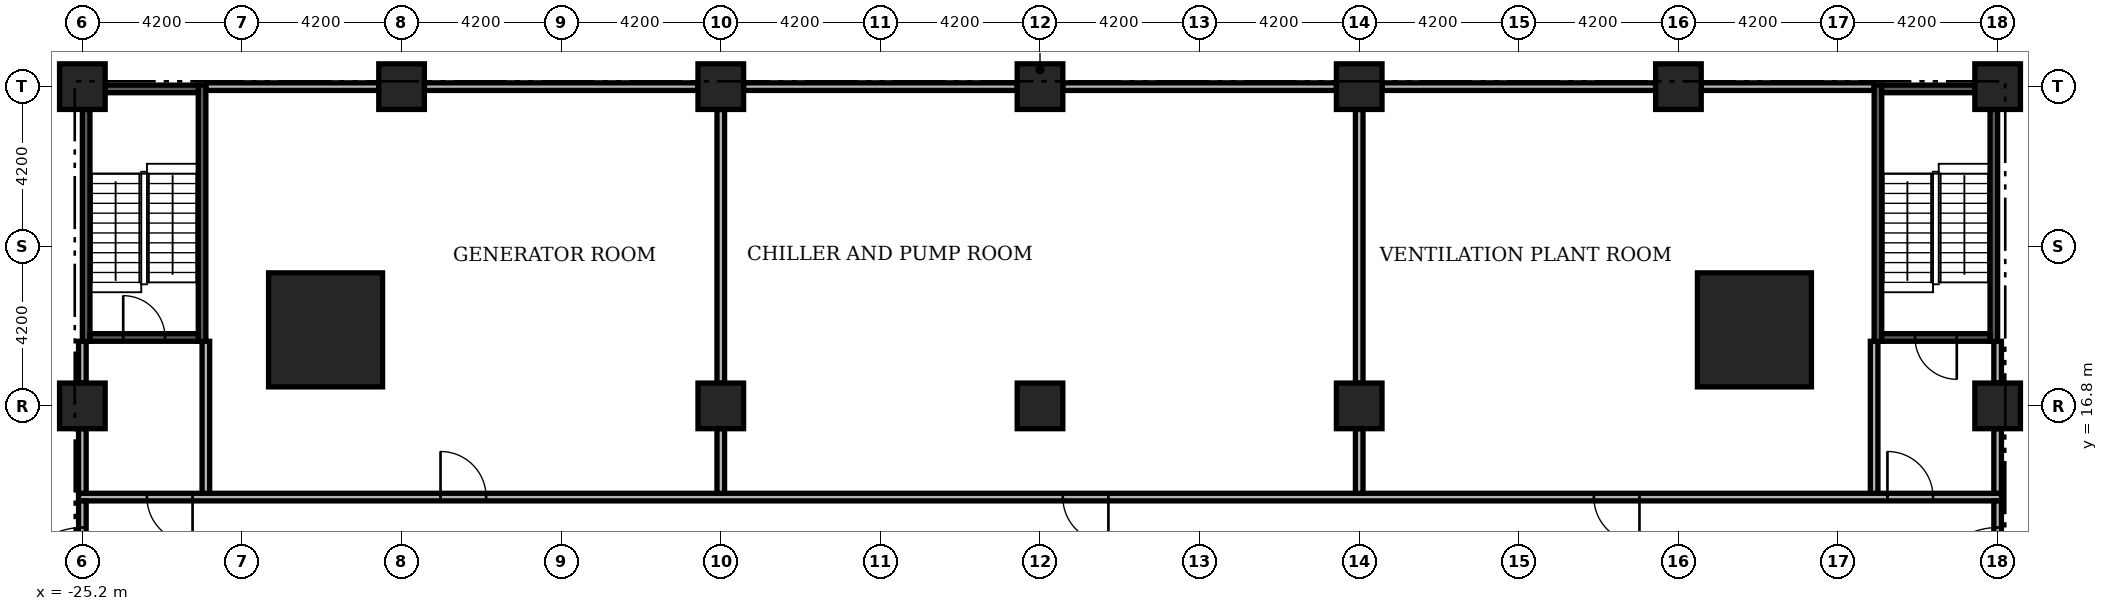
"""IFC4 building model, lengths in metres.
Left out: names, types, materials, properties, quantities, classifications, styles, units other than length and angle.
Written with IfcOpenShell. Run it as: python <this file> out.ifc"""

import sys

from ifc_helpers import new_model, si_unit, direction, frame, frame_2d, origin, origin_2d, place, context, subcontext, project, spatial, rectangle, extrude, element, fill, save


model = new_model("IFC4")
c1 = context("Model", 3, precision=1e-05, world=origin(), true_north=direction((0.0, 1.0)))
c2 = subcontext(c1, "Body", "Model", "MODEL_VIEW")
j1 = project(units=[si_unit("LENGTHUNIT", "METRE"), si_unit("PLANEANGLEUNIT", "RADIAN")], contexts=[c1])
p1 = place(None, origin())
s1 = spatial("IfcSite", under=j1, at=p1, CompositionType="ELEMENT")
p2 = place(p1, origin())
s2 = spatial("IfcBuilding", under=s1, at=p2, CompositionType="ELEMENT")
p3 = place(p2, frame((0.0, 0.0, -8.4)))
s3 = spatial("IfcBuildingStorey", under=s2, at=p3, CompositionType="ELEMENT", Elevation=-8.4)
for number, where, z_axis, x_axis in (
    (1, (18.8, 18.8, 0.0), (0.0, 0.0, 1.0), (1.0, 0.0, 0.0)),
    (2, (-18.8, 18.8, 0.0), (0.0, 0.0, 1.0), (1.0, 0.0, 0.0)),
):
    element("IfcColumn", number, at=place(p3, frame(where, z_axis=z_axis, x_axis=x_axis)), inside=s3, PredefinedType="COLUMN", context=c2, shape_type="SweptSolid", body=[
        extrude(rectangle(XDim=3.0, YDim=3.0, at=origin_2d()), origin(), (0.0, 0.0, 1.0), 4.2),
    ])
for number, where, z_axis, x_axis in (
    (3, (25.2, 16.8, 0.0), (0.0, 0.0, 1.0), (1.0, 0.0, 0.0)),
    (4, (0.0, 25.2, 0.0), (0.0, 0.0, 1.0), (1.0, 0.0, 0.0)),
    (5, (-8.4, 25.2, 0.0), (0.0, 0.0, 1.0), (1.0, 0.0, 0.0)),
    (6, (-16.8, 25.2, 0.0), (0.0, 0.0, 1.0), (1.0, 0.0, 0.0)),
    (7, (8.4, 25.2, 0.0), (0.0, 0.0, 1.0), (1.0, 0.0, 0.0)),
    (8, (16.8, 25.2, 0.0), (0.0, 0.0, 1.0), (1.0, 0.0, 0.0)),
    (9, (-25.2, 16.8, 0.0), (0.0, 0.0, 1.0), (1.0, 0.0, 0.0)),
    (10, (0.0, 16.8, 0.0), (0.0, 0.0, 1.0), (1.0, 0.0, 0.0)),
    (11, (8.4, 16.8, 0.0), (0.0, 0.0, 1.0), (1.0, 0.0, 0.0)),
    (12, (25.2, 25.2, 0.0), (0.0, 0.0, 1.0), (1.0, 0.0, 0.0)),
    (13, (-8.4, 16.8, 0.0), (0.0, 0.0, 1.0), (1.0, 0.0, 0.0)),
    (14, (-25.2, 25.2, 0.0), (0.0, 0.0, 1.0), (1.0, 0.0, 0.0)),
):
    element("IfcColumn", number, at=place(p3, frame(where, z_axis=z_axis, x_axis=x_axis)), inside=s3, PredefinedType="COLUMN", context=c2, shape_type="SweptSolid", body=[
        extrude(rectangle(XDim=1.2, YDim=1.2, at=origin_2d()), origin(), (0.0, 0.0, 1.0), 4.2),
    ])
p4 = place(p3, frame((-25.3, 14.4, 0.0), z_axis=(0.0, 0.0, 1.0), x_axis=(1.0, 0.0, 0.0)))
e15 = element("IfcWall", 15, at=p4, inside=s3, PredefinedType="PARTITIONING", context=c2, shape_type="SweptSolid", body=[
    extrude(rectangle(XDim=50.6, YDim=0.2, at=frame_2d((25.3, 0.0))), origin(), (0.0, 0.0, 1.0), 3.85),
])
p5 = place(p4, frame((1.8, 0.0, 0.0)))
e16 = element("IfcOpeningElement", 16, at=p5, cuts=e15, PredefinedType="OPENING", context=c2, shape_type="SweptSolid", body=[
    extrude(rectangle(XDim=1.2, YDim=2.2, at=frame_2d((0.6, 1.1))), frame((0.0, 0.11, 0.0), z_axis=(0.0, -1.0, 0.0), x_axis=(1.0, 0.0, 0.0)), (0.0, 0.0, 1.0), 0.22),
])
p6 = place(p4, frame((9.525, 0.0, 0.0)))
e17 = element("IfcOpeningElement", 17, at=p6, cuts=e15, PredefinedType="OPENING", context=c2, shape_type="SweptSolid", body=[
    extrude(rectangle(XDim=1.2, YDim=2.2, at=frame_2d((0.6, 1.1))), frame((0.0, 0.11, 0.0), z_axis=(0.0, -1.0, 0.0), x_axis=(1.0, 0.0, 0.0)), (0.0, 0.0, 1.0), 0.22),
])
p7 = place(p4, frame((25.9, 0.0, 0.0)))
e18 = element("IfcOpeningElement", 18, at=p7, cuts=e15, PredefinedType="OPENING", context=c2, shape_type="SweptSolid", body=[
    extrude(rectangle(XDim=1.2, YDim=2.2, at=frame_2d((0.6, 1.1))), frame((0.0, 0.11, 0.0), z_axis=(0.0, -1.0, 0.0), x_axis=(1.0, 0.0, 0.0)), (0.0, 0.0, 1.0), 0.22),
])
p8 = place(p4, frame((39.875, 0.0, 0.0)))
e19 = element("IfcOpeningElement", 19, at=p8, cuts=e15, PredefinedType="OPENING", context=c2, shape_type="SweptSolid", body=[
    extrude(rectangle(XDim=1.2, YDim=2.2, at=frame_2d((0.6, 1.1))), frame((0.0, 0.11, 0.0), z_axis=(0.0, -1.0, 0.0), x_axis=(1.0, 0.0, 0.0)), (0.0, 0.0, 1.0), 0.22),
])
p9 = place(p4, frame((47.6, 0.0, 0.0)))
e20 = element("IfcOpeningElement", 20, at=p9, cuts=e15, PredefinedType="OPENING", context=c2, shape_type="SweptSolid", body=[
    extrude(rectangle(XDim=1.2, YDim=2.2, at=frame_2d((0.6, 1.1))), frame((0.0, 0.11, 0.0), z_axis=(0.0, -1.0, 0.0), x_axis=(1.0, 0.0, 0.0)), (0.0, 0.0, 1.0), 0.22),
])
p10 = place(p3, frame((-21.95, 25.2, 0.0), z_axis=(0.0, 0.0, 1.0), x_axis=(1.0, 0.0, 0.0)))
e21 = element("IfcWall", 21, at=p10, inside=s3, PredefinedType="PARTITIONING", context=c2, shape_type="SweptSolid", body=[
    extrude(rectangle(XDim=4.55, YDim=0.2, at=frame_2d((2.275, 0.0))), origin(), (0.0, 0.0, 1.0), 3.85),
])
for number, where, z_axis, x_axis in (
    (22, (-16.2, 25.2, 0.0), (0.0, 0.0, 1.0), (1.0, 0.0, 0.0)),
    (23, (-7.8, 25.2, 0.0), (0.0, 0.0, 1.0), (1.0, 0.0, 0.0)),
    (24, (0.6, 25.2, 0.0), (0.0, 0.0, 1.0), (1.0, 0.0, 0.0)),
    (25, (9.0, 25.2, 0.0), (0.0, 0.0, 1.0), (1.0, 0.0, 0.0)),
):
    element("IfcWall", number, at=place(p3, frame(where, z_axis=z_axis, x_axis=x_axis)), inside=s3, PredefinedType="PARTITIONING", context=c2, shape_type="SweptSolid", body=[
        extrude(rectangle(XDim=7.2, YDim=0.2, at=frame_2d((3.6, 0.0))), origin(), (0.0, 0.0, 1.0), 3.85),
    ])
p11 = place(p3, frame((17.4, 25.2, 0.0), z_axis=(0.0, 0.0, 1.0), x_axis=(1.0, 0.0, 0.0)))
e26 = element("IfcWall", 26, at=p11, inside=s3, PredefinedType="PARTITIONING", context=c2, shape_type="SweptSolid", body=[
    extrude(rectangle(XDim=4.55, YDim=0.2, at=frame_2d((2.275, 0.0))), origin(), (0.0, 0.0, 1.0), 3.85),
])
p12 = place(p3, frame((-25.2, 11.1, 0.0), z_axis=(0.0, 0.0, 1.0), x_axis=(0.0, 1.0, 0.0)))
e27 = element("IfcWall", 27, at=p12, inside=s3, PredefinedType="PARTITIONING", context=c2, shape_type="SweptSolid", body=[
    extrude(rectangle(XDim=3.2, YDim=0.2, at=frame_2d((1.6, 0.0))), origin(), (0.0, 0.0, 1.0), 3.85),
])
p13 = place(p12, frame((0.7, 0.0, 0.0)))
e28 = element("IfcOpeningElement", 28, at=p13, cuts=e27, PredefinedType="OPENING", context=c2, shape_type="SweptSolid", body=[
    extrude(rectangle(XDim=1.8, YDim=2.2, at=frame_2d((0.9, 1.1))), frame((0.0, 0.11, 0.0), z_axis=(0.0, -1.0, 0.0), x_axis=(1.0, 0.0, 0.0)), (0.0, 0.0, 1.0), 0.22),
])
p14 = place(p3, frame((-25.2, 14.5, 0.0), z_axis=(0.0, 0.0, 1.0), x_axis=(0.0, 1.0, 0.0)))
e29 = element("IfcWall", 29, at=p14, inside=s3, PredefinedType="PARTITIONING", context=c2, shape_type="SweptSolid", body=[
    extrude(rectangle(XDim=1.7, YDim=0.2, at=frame_2d((0.85, 0.0))), origin(), (0.0, 0.0, 1.0), 3.85),
])
p15 = place(p3, frame((-25.2, 17.4, 0.0), z_axis=(0.0, 0.0, 1.0), x_axis=(0.0, 1.0, 0.0)))
e30 = element("IfcWall", 30, at=p15, inside=s3, PredefinedType="PARTITIONING", context=c2, shape_type="SweptSolid", body=[
    extrude(rectangle(XDim=1.1, YDim=0.2, at=frame_2d((0.55, 0.0))), origin(), (0.0, 0.0, 1.0), 3.85),
])
p16 = place(p3, frame((-21.95, 14.5, 0.0), z_axis=(0.0, 0.0, 1.0), x_axis=(0.0, 1.0, 0.0)))
e31 = element("IfcWall", 31, at=p16, inside=s3, PredefinedType="PARTITIONING", context=c2, shape_type="SweptSolid", body=[
    extrude(rectangle(XDim=4.0, YDim=0.2, at=frame_2d((2.0, 0.0))), origin(), (0.0, 0.0, 1.0), 3.85),
])
p17 = place(p3, frame((-8.4, 14.5, 0.0), z_axis=(0.0, 0.0, 1.0), x_axis=(0.0, 1.0, 0.0)))
e32 = element("IfcWall", 32, at=p17, inside=s3, PredefinedType="PARTITIONING", context=c2, shape_type="SweptSolid", body=[
    extrude(rectangle(XDim=1.7, YDim=0.2, at=frame_2d((0.85, 0.0))), origin(), (0.0, 0.0, 1.0), 3.85),
])
p18 = place(p3, frame((-8.4, 17.4, 0.0), z_axis=(0.0, 0.0, 1.0), x_axis=(0.0, 1.0, 0.0)))
e33 = element("IfcWall", 33, at=p18, inside=s3, PredefinedType="PARTITIONING", context=c2, shape_type="SweptSolid", body=[
    extrude(rectangle(XDim=7.2, YDim=0.2, at=frame_2d((3.6, 0.0))), origin(), (0.0, 0.0, 1.0), 3.85),
])
p19 = place(p3, frame((8.4, 14.5, 0.0), z_axis=(0.0, 0.0, 1.0), x_axis=(0.0, 1.0, 0.0)))
e34 = element("IfcWall", 34, at=p19, inside=s3, PredefinedType="PARTITIONING", context=c2, shape_type="SweptSolid", body=[
    extrude(rectangle(XDim=1.7, YDim=0.2, at=frame_2d((0.85, 0.0))), origin(), (0.0, 0.0, 1.0), 3.85),
])
p20 = place(p3, frame((8.4, 17.4, 0.0), z_axis=(0.0, 0.0, 1.0), x_axis=(0.0, 1.0, 0.0)))
e35 = element("IfcWall", 35, at=p20, inside=s3, PredefinedType="PARTITIONING", context=c2, shape_type="SweptSolid", body=[
    extrude(rectangle(XDim=7.2, YDim=0.2, at=frame_2d((3.6, 0.0))), origin(), (0.0, 0.0, 1.0), 3.85),
])
p21 = place(p3, frame((21.95, 14.5, 0.0), z_axis=(0.0, 0.0, 1.0), x_axis=(0.0, 1.0, 0.0)))
e36 = element("IfcWall", 36, at=p21, inside=s3, PredefinedType="PARTITIONING", context=c2, shape_type="SweptSolid", body=[
    extrude(rectangle(XDim=4.0, YDim=0.2, at=frame_2d((2.0, 0.0))), origin(), (0.0, 0.0, 1.0), 3.85),
])
p22 = place(p3, frame((25.2, 11.1, 0.0), z_axis=(0.0, 0.0, 1.0), x_axis=(0.0, 1.0, 0.0)))
e37 = element("IfcWall", 37, at=p22, inside=s3, PredefinedType="PARTITIONING", context=c2, shape_type="SweptSolid", body=[
    extrude(rectangle(XDim=3.2, YDim=0.2, at=frame_2d((1.6, 0.0))), origin(), (0.0, 0.0, 1.0), 3.85),
])
p23 = place(p22, frame((0.7, 0.0, 0.0)))
e38 = element("IfcOpeningElement", 38, at=p23, cuts=e37, PredefinedType="OPENING", context=c2, shape_type="SweptSolid", body=[
    extrude(rectangle(XDim=1.8, YDim=2.2, at=frame_2d((0.9, 1.1))), frame((0.0, 0.11, 0.0), z_axis=(0.0, -1.0, 0.0), x_axis=(1.0, 0.0, 0.0)), (0.0, 0.0, 1.0), 0.22),
])
p24 = place(p3, frame((25.2, 14.5, 0.0), z_axis=(0.0, 0.0, 1.0), x_axis=(0.0, 1.0, 0.0)))
e39 = element("IfcWall", 39, at=p24, inside=s3, PredefinedType="PARTITIONING", context=c2, shape_type="SweptSolid", body=[
    extrude(rectangle(XDim=1.7, YDim=0.2, at=frame_2d((0.85, 0.0))), origin(), (0.0, 0.0, 1.0), 3.85),
])
p25 = place(p3, frame((25.2, 17.4, 0.0), z_axis=(0.0, 0.0, 1.0), x_axis=(0.0, 1.0, 0.0)))
e40 = element("IfcWall", 40, at=p25, inside=s3, PredefinedType="PARTITIONING", context=c2, shape_type="SweptSolid", body=[
    extrude(rectangle(XDim=1.1, YDim=0.2, at=frame_2d((0.55, 0.0))), origin(), (0.0, 0.0, 1.0), 3.85),
])
p26 = place(p3, frame((22.05, 18.5, 0.0), z_axis=(0.0, 0.0, 1.0), x_axis=(0.0, 1.0, 0.0)))
e41 = element("IfcWall", 41, at=p26, inside=s3, PredefinedType="SOLIDWALL", context=c2, shape_type="SweptSolid", body=[
    extrude(rectangle(XDim=6.74, YDim=0.2, at=frame_2d((3.37, 0.0))), origin(), (0.0, 0.0, 1.0), 3.85),
])
p27 = place(p3, frame((25.1, 18.5, 0.0), z_axis=(0.0, 0.0, 1.0), x_axis=(0.0, 1.0, 0.0)))
e42 = element("IfcWall", 42, at=p27, inside=s3, PredefinedType="SOLIDWALL", context=c2, shape_type="SweptSolid", body=[
    extrude(rectangle(XDim=6.1, YDim=0.2, at=frame_2d((3.05, 0.0))), origin(), (0.0, 0.0, 1.0), 3.85),
])
p28 = place(p3, frame((22.15, 18.6, 0.0), z_axis=(0.0, 0.0, 1.0), x_axis=(1.0, 0.0, 0.0)))
e43 = element("IfcWall", 43, at=p28, inside=s3, PredefinedType="SOLIDWALL", context=c2, shape_type="SweptSolid", body=[
    extrude(rectangle(XDim=2.85, YDim=0.2, at=frame_2d((1.425, 0.0))), origin(), (0.0, 0.0, 1.0), 3.85),
])
p29 = place(p28, frame((0.875, 0.0, 0.0)))
e44 = element("IfcOpeningElement", 44, at=p29, cuts=e43, PredefinedType="OPENING", context=c2, shape_type="SweptSolid", body=[
    extrude(rectangle(XDim=1.1, YDim=2.2, at=frame_2d((0.55, 1.1))), frame((0.0, 0.11, 0.0), z_axis=(0.0, -1.0, 0.0), x_axis=(1.0, 0.0, 0.0)), (0.0, 0.0, 1.0), 0.22),
])
p30 = place(p3, frame((22.15, 25.14, 0.0), z_axis=(0.0, 0.0, 1.0), x_axis=(1.0, 0.0, 0.0)))
e45 = element("IfcWall", 45, at=p30, inside=s3, PredefinedType="SOLIDWALL", context=c2, shape_type="SweptSolid", body=[
    extrude(rectangle(XDim=2.45, YDim=0.2, at=frame_2d((1.225, 0.0))), origin(), (0.0, 0.0, 1.0), 3.85),
])
p31 = place(p3, frame((-25.1, 18.5, 0.0), z_axis=(0.0, 0.0, 1.0), x_axis=(0.0, 1.0, 0.0)))
e46 = element("IfcWall", 46, at=p31, inside=s3, PredefinedType="SOLIDWALL", context=c2, shape_type="SweptSolid", body=[
    extrude(rectangle(XDim=6.1, YDim=0.2, at=frame_2d((3.05, 0.0))), origin(), (0.0, 0.0, 1.0), 3.85),
])
p32 = place(p3, frame((-22.05, 18.5, 0.0), z_axis=(0.0, 0.0, 1.0), x_axis=(0.0, 1.0, 0.0)))
e47 = element("IfcWall", 47, at=p32, inside=s3, PredefinedType="SOLIDWALL", context=c2, shape_type="SweptSolid", body=[
    extrude(rectangle(XDim=6.74, YDim=0.2, at=frame_2d((3.37, 0.0))), origin(), (0.0, 0.0, 1.0), 3.85),
])
p33 = place(p3, frame((-25.0, 18.6, 0.0), z_axis=(0.0, 0.0, 1.0), x_axis=(1.0, 0.0, 0.0)))
e48 = element("IfcWall", 48, at=p33, inside=s3, PredefinedType="SOLIDWALL", context=c2, shape_type="SweptSolid", body=[
    extrude(rectangle(XDim=2.85, YDim=0.2, at=frame_2d((1.425, 0.0))), origin(), (0.0, 0.0, 1.0), 3.85),
])
p34 = place(p33, frame((0.875, 0.0, 0.0)))
e49 = element("IfcOpeningElement", 49, at=p34, cuts=e48, PredefinedType="OPENING", context=c2, shape_type="SweptSolid", body=[
    extrude(rectangle(XDim=1.1, YDim=2.2, at=frame_2d((0.55, 1.1))), frame((0.0, 0.11, 0.0), z_axis=(0.0, -1.0, 0.0), x_axis=(1.0, 0.0, 0.0)), (0.0, 0.0, 1.0), 0.22),
])
p35 = place(p3, frame((-24.6, 25.14, 0.0), z_axis=(0.0, 0.0, 1.0), x_axis=(1.0, 0.0, 0.0)))
e50 = element("IfcWall", 50, at=p35, inside=s3, PredefinedType="SOLIDWALL", context=c2, shape_type="SweptSolid", body=[
    extrude(rectangle(XDim=2.45, YDim=0.2, at=frame_2d((1.225, 0.0))), origin(), (0.0, 0.0, 1.0), 3.85),
])
p36 = place(p13, origin())
e51 = element("IfcDoor", 51, at=p36, inside=s3, OperationType="DOUBLE_DOOR_SINGLE_SWING", PredefinedType="DOOR", context=c2, shape_type="SweptSolid", body=[
    extrude(rectangle(XDim=1.8, YDim=2.2, at=frame_2d((0.9, 1.1))), frame((0.0, 0.025, 0.0), z_axis=(0.0, -1.0, 0.0), x_axis=(1.0, 0.0, 0.0)), (0.0, 0.0, 1.0), 0.05),
])
fill(e28, e51)
p37 = place(p23, origin())
e52 = element("IfcDoor", 52, at=p37, inside=s3, OperationType="DOUBLE_DOOR_SINGLE_SWING", PredefinedType="DOOR", context=c2, shape_type="SweptSolid", body=[
    extrude(rectangle(XDim=1.8, YDim=2.2, at=frame_2d((0.9, 1.1))), frame((0.0, 0.025, 0.0), z_axis=(0.0, -1.0, 0.0), x_axis=(1.0, 0.0, 0.0)), (0.0, 0.0, 1.0), 0.05),
])
fill(e38, e52)
p38 = place(p5, origin())
e53 = element("IfcDoor", 53, at=p38, inside=s3, OperationType="SINGLE_SWING_RIGHT", PredefinedType="DOOR", context=c2, shape_type="SweptSolid", body=[
    extrude(rectangle(XDim=1.2, YDim=2.2, at=frame_2d((0.6, 1.1))), frame((0.0, 0.025, 0.0), z_axis=(0.0, -1.0, 0.0), x_axis=(1.0, 0.0, 0.0)), (0.0, 0.0, 1.0), 0.05),
])
fill(e16, e53)
p39 = place(p6, origin())
e54 = element("IfcDoor", 54, at=p39, inside=s3, OperationType="SINGLE_SWING_LEFT", PredefinedType="DOOR", context=c2, shape_type="SweptSolid", body=[
    extrude(rectangle(XDim=1.2, YDim=2.2, at=frame_2d((0.6, 1.1))), frame((0.0, 0.025, 0.0), z_axis=(0.0, -1.0, 0.0), x_axis=(1.0, 0.0, 0.0)), (0.0, 0.0, 1.0), 0.05),
])
fill(e17, e54)
p40 = place(p7, origin())
e55 = element("IfcDoor", 55, at=p40, inside=s3, OperationType="SINGLE_SWING_RIGHT", PredefinedType="DOOR", context=c2, shape_type="SweptSolid", body=[
    extrude(rectangle(XDim=1.2, YDim=2.2, at=frame_2d((0.6, 1.1))), frame((0.0, 0.025, 0.0), z_axis=(0.0, -1.0, 0.0), x_axis=(1.0, 0.0, 0.0)), (0.0, 0.0, 1.0), 0.05),
])
fill(e18, e55)
p41 = place(p8, origin())
e56 = element("IfcDoor", 56, at=p41, inside=s3, OperationType="SINGLE_SWING_RIGHT", PredefinedType="DOOR", context=c2, shape_type="SweptSolid", body=[
    extrude(rectangle(XDim=1.2, YDim=2.2, at=frame_2d((0.6, 1.1))), frame((0.0, 0.025, 0.0), z_axis=(0.0, -1.0, 0.0), x_axis=(1.0, 0.0, 0.0)), (0.0, 0.0, 1.0), 0.05),
])
fill(e19, e56)
p42 = place(p9, origin())
e57 = element("IfcDoor", 57, at=p42, inside=s3, OperationType="SINGLE_SWING_LEFT", PredefinedType="DOOR", context=c2, shape_type="SweptSolid", body=[
    extrude(rectangle(XDim=1.2, YDim=2.2, at=frame_2d((0.6, 1.1))), frame((0.0, 0.025, 0.0), z_axis=(0.0, -1.0, 0.0), x_axis=(1.0, 0.0, 0.0)), (0.0, 0.0, 1.0), 0.05),
])
fill(e20, e57)
p43 = place(p29, origin())
e58 = element("IfcDoor", 58, at=p43, inside=s3, OperationType="SINGLE_SWING_RIGHT", PredefinedType="DOOR", context=c2, shape_type="SweptSolid", body=[
    extrude(rectangle(XDim=1.1, YDim=2.2, at=frame_2d((0.55, 1.1))), frame((0.0, 0.025, 0.0), z_axis=(0.0, -1.0, 0.0), x_axis=(1.0, 0.0, 0.0)), (0.0, 0.0, 1.0), 0.05),
])
fill(e44, e58)
p44 = place(p34, origin())
e59 = element("IfcDoor", 59, at=p44, inside=s3, OperationType="SINGLE_SWING_LEFT", PredefinedType="DOOR", context=c2, shape_type="SweptSolid", body=[
    extrude(rectangle(XDim=1.1, YDim=2.2, at=frame_2d((0.55, 1.1))), frame((0.0, 0.025, 0.0), z_axis=(0.0, -1.0, 0.0), x_axis=(1.0, 0.0, 0.0)), (0.0, 0.0, 1.0), 0.05),
])
fill(e49, e59)
save(model, sys.argv[1])
